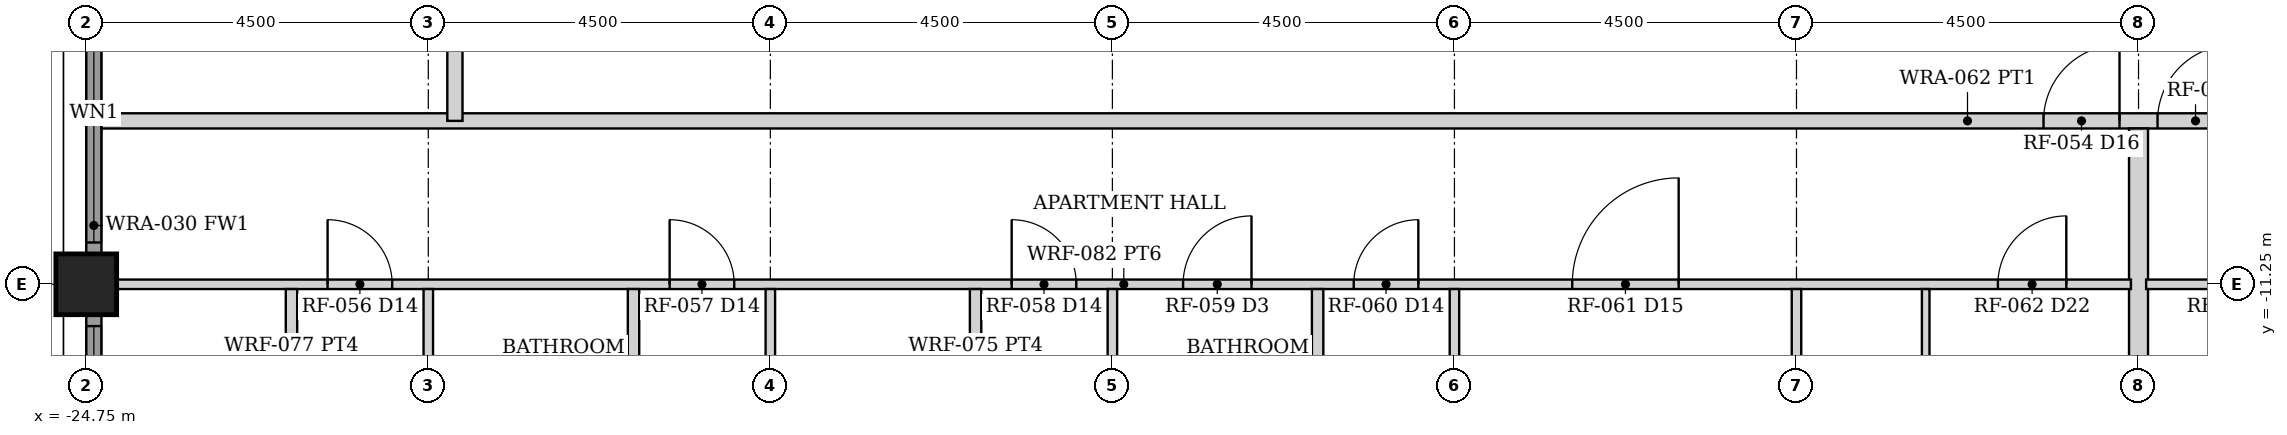
"""IFC4 building model, lengths in metres.
Left out: names, types, materials, properties, quantities, classifications, styles, units other than length and angle.
Written with IfcOpenShell. Run it as: python <this file> out.ifc"""

import sys

from ifc_helpers import new_model, si_unit, direction, frame, frame_2d, origin, origin_2d, place, context, subcontext, project, spatial, rectangle, hollow_rectangle, extrude, element, fill, save


model = new_model("IFC4")
c1 = context("Model", 3, precision=1e-05, world=origin(), true_north=direction((0.0, 1.0)))
c2 = subcontext(c1, "Body", "Model", "MODEL_VIEW")
j1 = project(units=[si_unit("LENGTHUNIT", "METRE"), si_unit("PLANEANGLEUNIT", "RADIAN")], contexts=[c1])
p1 = place(None, origin())
s1 = spatial("IfcSite", under=j1, at=p1, CompositionType="ELEMENT")
p2 = place(p1, origin())
s2 = spatial("IfcBuilding", under=s1, at=p2, CompositionType="ELEMENT")
p3 = place(p2, frame((0.0, 0.0, 79.0)))
s3 = spatial("IfcBuildingStorey", under=s2, at=p3, CompositionType="ELEMENT", Elevation=79.0)
p4 = place(p3, frame((-24.75, -11.25, 0.0), z_axis=(0.0, 0.0, 1.0), x_axis=(1.0, 0.0, 0.0)))
e1 = element("IfcColumn", 1, at=p4, inside=s3, PredefinedType="COLUMN", context=c2, shape_type="SweptSolid", body=[
    extrude(hollow_rectangle(XDim=0.8, YDim=0.8, WallThickness=0.06, at=origin_2d()), origin(), (0.0, 0.0, 1.0), 3.5),
])
p5 = place(p3, frame((-24.65, -15.345, 0.0), z_axis=(0.0, 0.0, 1.0), x_axis=(0.0, 1.0, 0.0)))
e2 = element("IfcWall", 2, at=p5, inside=s3, PredefinedType="SOLIDWALL", context=c2, shape_type="SweptSolid", body=[
    extrude(rectangle(XDim=3.69, YDim=0.2, at=frame_2d((1.845, 0.0))), origin(), (0.0, 0.0, 1.0), 2.379),
])
p6 = place(p5, frame((0.145, 0.0, 0.3)))
e3 = element("IfcOpeningElement", 3, at=p6, cuts=e2, PredefinedType="OPENING", context=c2, shape_type="SweptSolid", body=[
    extrude(rectangle(XDim=3.4, YDim=1.929, at=frame_2d((1.7, 0.964))), frame((0.0, 0.11, 0.0), z_axis=(0.0, -1.0, 0.0), x_axis=(1.0, 0.0, 0.0)), (0.0, 0.0, 1.0), 0.22),
])
p7 = place(p3, frame((-24.65, -10.845, 0.0), z_axis=(0.0, 0.0, 1.0), x_axis=(0.0, 1.0, 0.0)))
e4 = element("IfcWall", 4, at=p7, inside=s3, PredefinedType="SOLIDWALL", context=c2, shape_type="SweptSolid", body=[
    extrude(rectangle(XDim=3.69, YDim=0.2, at=frame_2d((1.845, 0.0))), origin(), (0.0, 0.0, 1.0), 2.379),
])
p8 = place(p7, frame((0.145, 0.0, 0.3)))
e5 = element("IfcOpeningElement", 5, at=p8, cuts=e4, PredefinedType="OPENING", context=c2, shape_type="SweptSolid", body=[
    extrude(rectangle(XDim=3.4, YDim=1.929, at=frame_2d((1.7, 0.964))), frame((0.0, 0.11, 0.0), z_axis=(0.0, -1.0, 0.0), x_axis=(1.0, 0.0, 0.0)), (0.0, 0.0, 1.0), 0.22),
])
p9 = place(p3, frame((-24.55, -9.1, 0.0), z_axis=(0.0, 0.0, 1.0), x_axis=(1.0, 0.0, 0.0)))
e6 = element("IfcWall", 6, at=p9, inside=s3, PredefinedType="PARTITIONING", context=c2, shape_type="SweptSolid", body=[
    extrude(rectangle(XDim=49.1, YDim=0.2, at=frame_2d((24.55, 0.0))), origin(), (0.0, 0.0, 1.0), 2.373),
])
p10 = place(p9, frame((25.55, 0.0, 0.0)))
e7 = element("IfcOpeningElement", 7, at=p10, cuts=e6, PredefinedType="OPENING", context=c2, shape_type="SweptSolid", body=[
    extrude(rectangle(XDim=1.0, YDim=2.3, at=frame_2d((0.5, 1.15))), frame((0.0, 0.11, 0.0), z_axis=(0.0, -1.0, 0.0), x_axis=(1.0, 0.0, 0.0)), (0.0, 0.0, 1.0), 0.22),
])
p11 = place(p9, frame((27.05, 0.0, 0.0)))
e8 = element("IfcOpeningElement", 8, at=p11, cuts=e6, PredefinedType="OPENING", context=c2, shape_type="SweptSolid", body=[
    extrude(rectangle(XDim=1.0, YDim=2.3, at=frame_2d((0.5, 1.15))), frame((0.0, 0.11, 0.0), z_axis=(0.0, -1.0, 0.0), x_axis=(1.0, 0.0, 0.0)), (0.0, 0.0, 1.0), 0.22),
])
p12 = place(p3, frame((-19.9, -9.1, 0.0), z_axis=(0.0, 0.0, 1.0), x_axis=(0.0, 1.0, 0.0)))
e9 = element("IfcWall", 9, at=p12, inside=s3, PredefinedType="PARTITIONING", context=c2, shape_type="SweptSolid", body=[
    extrude(rectangle(XDim=18.2, YDim=0.2, at=frame_2d((9.1, 0.0))), origin(), (0.0, 0.0, 1.0), 2.373),
])
p13 = place(p12, frame((6.35, 0.0, 0.0)))
e10 = element("IfcOpeningElement", 10, at=p13, cuts=e9, PredefinedType="OPENING", context=c2, shape_type="SweptSolid", body=[
    extrude(rectangle(XDim=1.0, YDim=2.3, at=frame_2d((0.5, 1.15))), frame((0.0, 0.11, 0.0), z_axis=(0.0, -1.0, 0.0), x_axis=(1.0, 0.0, 0.0)), (0.0, 0.0, 1.0), 0.22),
])
p14 = place(p3, frame((2.25, -24.35, 0.0), z_axis=(0.0, 0.0, 1.0), x_axis=(0.0, 1.0, 0.0)))
e11 = element("IfcWall", 11, at=p14, inside=s3, PredefinedType="PARTITIONING", context=c2, shape_type="SweptSolid", body=[
    extrude(rectangle(XDim=15.15, YDim=0.25, at=frame_2d((7.575, 0.0))), origin(), (0.0, 0.0, 1.0), 2.373),
])
p15 = place(p3, frame((-24.35, -11.25, 0.0), z_axis=(0.0, 0.0, 1.0), x_axis=(1.0, 0.0, 0.0)))
e12 = element("IfcWall", 12, at=p15, inside=s3, PredefinedType="PARTITIONING", context=c2, shape_type="SweptSolid", body=[
    extrude(rectangle(XDim=26.5, YDim=0.125, at=frame_2d((13.25, 0.0))), origin(), (0.0, 0.0, 1.0), 2.373),
])
p16 = place(p15, frame((24.75, 0.0, 0.0)))
e13 = element("IfcOpeningElement", 13, at=p16, cuts=e12, PredefinedType="OPENING", context=c2, shape_type="SweptSolid", body=[
    extrude(rectangle(XDim=0.9, YDim=2.1, at=frame_2d((0.45, 1.05))), frame((0.0, 0.073, 0.0), z_axis=(0.0, -1.0, 0.0), x_axis=(1.0, 0.0, 0.0)), (0.0, 0.0, 1.0), 0.145),
])
p17 = place(p15, frame((19.15, 0.0, 0.0)))
e14 = element("IfcOpeningElement", 14, at=p17, cuts=e12, PredefinedType="OPENING", context=c2, shape_type="SweptSolid", body=[
    extrude(rectangle(XDim=1.4, YDim=2.1, at=frame_2d((0.7, 1.05))), frame((0.0, 0.073, 0.0), z_axis=(0.0, -1.0, 0.0), x_axis=(1.0, 0.0, 0.0)), (0.0, 0.0, 1.0), 0.145),
])
p18 = place(p15, frame((16.275, 0.0, 0.0)))
e15 = element("IfcOpeningElement", 15, at=p18, cuts=e12, PredefinedType="OPENING", context=c2, shape_type="SweptSolid", body=[
    extrude(rectangle(XDim=0.85, YDim=2.1, at=frame_2d((0.425, 1.05))), frame((0.0, 0.073, 0.0), z_axis=(0.0, -1.0, 0.0), x_axis=(1.0, 0.0, 0.0)), (0.0, 0.0, 1.0), 0.145),
])
p19 = place(p15, frame((14.03, 0.0, 0.0)))
e16 = element("IfcOpeningElement", 16, at=p19, cuts=e12, PredefinedType="OPENING", context=c2, shape_type="SweptSolid", body=[
    extrude(rectangle(XDim=0.9, YDim=2.1, at=frame_2d((0.45, 1.05))), frame((0.0, 0.073, 0.0), z_axis=(0.0, -1.0, 0.0), x_axis=(1.0, 0.0, 0.0)), (0.0, 0.0, 1.0), 0.145),
])
p20 = place(p15, frame((11.775, 0.0, 0.0)))
e17 = element("IfcOpeningElement", 17, at=p20, cuts=e12, PredefinedType="OPENING", context=c2, shape_type="SweptSolid", body=[
    extrude(rectangle(XDim=0.85, YDim=2.1, at=frame_2d((0.425, 1.05))), frame((0.0, 0.073, 0.0), z_axis=(0.0, -1.0, 0.0), x_axis=(1.0, 0.0, 0.0)), (0.0, 0.0, 1.0), 0.145),
])
p21 = place(p15, frame((7.275, 0.0, 0.0)))
e18 = element("IfcOpeningElement", 18, at=p21, cuts=e12, PredefinedType="OPENING", context=c2, shape_type="SweptSolid", body=[
    extrude(rectangle(XDim=0.85, YDim=2.1, at=frame_2d((0.425, 1.05))), frame((0.0, 0.073, 0.0), z_axis=(0.0, -1.0, 0.0), x_axis=(1.0, 0.0, 0.0)), (0.0, 0.0, 1.0), 0.145),
])
p22 = place(p15, frame((2.775, 0.0, 0.0)))
e19 = element("IfcOpeningElement", 19, at=p22, cuts=e12, PredefinedType="OPENING", context=c2, shape_type="SweptSolid", body=[
    extrude(rectangle(XDim=0.85, YDim=2.1, at=frame_2d((0.425, 1.05))), frame((0.0, 0.073, 0.0), z_axis=(0.0, -1.0, 0.0), x_axis=(1.0, 0.0, 0.0)), (0.0, 0.0, 1.0), 0.145),
])
p23 = place(p3, frame((-0.55, -15.363, 0.0), z_axis=(0.0, 0.0, 1.0), x_axis=(0.0, 1.0, 0.0)))
e20 = element("IfcWall", 20, at=p23, inside=s3, PredefinedType="PARTITIONING", context=c2, shape_type="SweptSolid", body=[
    extrude(rectangle(XDim=4.05, YDim=0.1, at=frame_2d((2.025, 0.0))), origin(), (0.0, 0.0, 1.0), 2.373),
])
p24 = place(p3, frame((-2.25, -24.35, 0.0), z_axis=(0.0, 0.0, 1.0), x_axis=(0.0, 1.0, 0.0)))
e21 = element("IfcWall", 21, at=p24, inside=s3, PredefinedType="PARTITIONING", context=c2, shape_type="SweptSolid", body=[
    extrude(rectangle(XDim=13.038, YDim=0.125, at=frame_2d((6.519, 0.0))), origin(), (0.0, 0.0, 1.0), 2.373),
])
p25 = place(p24, frame((3.844, 0.0, 0.0)))
e22 = element("IfcOpeningElement", 22, at=p25, cuts=e21, PredefinedType="OPENING", context=c2, shape_type="SweptSolid", body=[
    extrude(rectangle(XDim=1.4, YDim=2.1, at=frame_2d((0.7, 1.05))), frame((0.0, 0.073, 0.0), z_axis=(0.0, -1.0, 0.0), x_axis=(1.0, 0.0, 0.0)), (0.0, 0.0, 1.0), 0.145),
])
p26 = place(p3, frame((-6.75, -24.35, 0.0), z_axis=(0.0, 0.0, 1.0), x_axis=(0.0, 1.0, 0.0)))
e23 = element("IfcWall", 23, at=p26, inside=s3, PredefinedType="PARTITIONING", context=c2, shape_type="SweptSolid", body=[
    extrude(rectangle(XDim=13.038, YDim=0.125, at=frame_2d((6.519, 0.0))), origin(), (0.0, 0.0, 1.0), 2.373),
])
p27 = place(p3, frame((-8.55, -14.4, 0.0), z_axis=(0.0, 0.0, 1.0), x_axis=(0.0, 1.0, 0.0)))
e24 = element("IfcWall", 24, at=p27, inside=s3, PredefinedType="PARTITIONING", context=c2, shape_type="SweptSolid", body=[
    extrude(rectangle(XDim=3.087, YDim=0.15, at=frame_2d((1.544, 0.0))), origin(), (0.0, 0.0, 1.0), 2.373),
])
p28 = place(p27, frame((1.2, 0.0, 0.0)))
e25 = element("IfcOpeningElement", 25, at=p28, cuts=e24, PredefinedType="OPENING", context=c2, shape_type="SweptSolid", body=[
    extrude(rectangle(XDim=0.8, YDim=2.1, at=frame_2d((0.4, 1.05))), frame((0.0, 0.085, 0.0), z_axis=(0.0, -1.0, 0.0), x_axis=(1.0, 0.0, 0.0)), (0.0, 0.0, 1.0), 0.17),
])
p29 = place(p3, frame((-11.25, -24.35, 0.0), z_axis=(0.0, 0.0, 1.0), x_axis=(0.0, 1.0, 0.0)))
e26 = element("IfcWall", 26, at=p29, inside=s3, PredefinedType="PARTITIONING", context=c2, shape_type="SweptSolid", body=[
    extrude(rectangle(XDim=13.038, YDim=0.125, at=frame_2d((6.519, 0.0))), origin(), (0.0, 0.0, 1.0), 2.373),
])
p30 = place(p3, frame((-13.05, -14.4, 0.0), z_axis=(0.0, 0.0, 1.0), x_axis=(0.0, 1.0, 0.0)))
e27 = element("IfcWall", 27, at=p30, inside=s3, PredefinedType="PARTITIONING", context=c2, shape_type="SweptSolid", body=[
    extrude(rectangle(XDim=3.087, YDim=0.15, at=frame_2d((1.544, 0.0))), origin(), (0.0, 0.0, 1.0), 2.373),
])
p31 = place(p30, frame((1.2, 0.0, 0.0)))
e28 = element("IfcOpeningElement", 28, at=p31, cuts=e27, PredefinedType="OPENING", context=c2, shape_type="SweptSolid", body=[
    extrude(rectangle(XDim=0.8, YDim=2.1, at=frame_2d((0.4, 1.05))), frame((0.0, 0.085, 0.0), z_axis=(0.0, -1.0, 0.0), x_axis=(1.0, 0.0, 0.0)), (0.0, 0.0, 1.0), 0.17),
])
p32 = place(p3, frame((-15.75, -24.35, 0.0), z_axis=(0.0, 0.0, 1.0), x_axis=(0.0, 1.0, 0.0)))
e29 = element("IfcWall", 29, at=p32, inside=s3, PredefinedType="PARTITIONING", context=c2, shape_type="SweptSolid", body=[
    extrude(rectangle(XDim=13.038, YDim=0.125, at=frame_2d((6.519, 0.0))), origin(), (0.0, 0.0, 1.0), 2.373),
])
p33 = place(p3, frame((-17.55, -14.4, 0.0), z_axis=(0.0, 0.0, 1.0), x_axis=(0.0, 1.0, 0.0)))
e30 = element("IfcWall", 30, at=p33, inside=s3, PredefinedType="PARTITIONING", context=c2, shape_type="SweptSolid", body=[
    extrude(rectangle(XDim=3.087, YDim=0.15, at=frame_2d((1.544, 0.0))), origin(), (0.0, 0.0, 1.0), 2.373),
])
p34 = place(p33, frame((1.2, 0.0, 0.0)))
e31 = element("IfcOpeningElement", 31, at=p34, cuts=e30, PredefinedType="OPENING", context=c2, shape_type="SweptSolid", body=[
    extrude(rectangle(XDim=0.8, YDim=2.1, at=frame_2d((0.4, 1.05))), frame((0.0, 0.085, 0.0), z_axis=(0.0, -1.0, 0.0), x_axis=(1.0, 0.0, 0.0)), (0.0, 0.0, 1.0), 0.17),
])
p35 = place(p3, frame((-20.25, -24.35, 0.0), z_axis=(0.0, 0.0, 1.0), x_axis=(0.0, 1.0, 0.0)))
e32 = element("IfcWall", 32, at=p35, inside=s3, PredefinedType="PARTITIONING", context=c2, shape_type="SweptSolid", body=[
    extrude(rectangle(XDim=13.038, YDim=0.125, at=frame_2d((6.519, 0.0))), origin(), (0.0, 0.0, 1.0), 2.373),
])
p36 = place(p3, frame((-22.05, -14.4, 0.0), z_axis=(0.0, 0.0, 1.0), x_axis=(0.0, 1.0, 0.0)))
e33 = element("IfcWall", 33, at=p36, inside=s3, PredefinedType="PARTITIONING", context=c2, shape_type="SweptSolid", body=[
    extrude(rectangle(XDim=3.087, YDim=0.15, at=frame_2d((1.544, 0.0))), origin(), (0.0, 0.0, 1.0), 2.373),
])
p37 = place(p36, frame((1.2, 0.0, 0.0)))
e34 = element("IfcOpeningElement", 34, at=p37, cuts=e33, PredefinedType="OPENING", context=c2, shape_type="SweptSolid", body=[
    extrude(rectangle(XDim=0.8, YDim=2.1, at=frame_2d((0.4, 1.05))), frame((0.0, 0.085, 0.0), z_axis=(0.0, -1.0, 0.0), x_axis=(1.0, 0.0, 0.0)), (0.0, 0.0, 1.0), 0.17),
])
p38 = place(p3, frame((2.35, -11.25, 0.0), z_axis=(0.0, 0.0, 1.0), x_axis=(1.0, 0.0, 0.0)))
e35 = element("IfcWall", 35, at=p38, inside=s3, PredefinedType="PARTITIONING", context=c2, shape_type="SweptSolid", body=[
    extrude(rectangle(XDim=22.0, YDim=0.125, at=frame_2d((11.0, 0.0))), origin(), (0.0, 0.0, 1.0), 2.373),
])
p39 = place(p38, frame((0.85, 0.0, 0.0)))
e36 = element("IfcOpeningElement", 36, at=p39, cuts=e35, PredefinedType="OPENING", context=c2, shape_type="SweptSolid", body=[
    extrude(rectangle(XDim=0.9, YDim=2.1, at=frame_2d((0.45, 1.05))), frame((0.0, 0.073, 0.0), z_axis=(0.0, -1.0, 0.0), x_axis=(1.0, 0.0, 0.0)), (0.0, 0.0, 1.0), 0.145),
])
p40 = place(p38, frame((5.95, 0.0, 0.0)))
e37 = element("IfcOpeningElement", 37, at=p40, cuts=e35, PredefinedType="OPENING", context=c2, shape_type="SweptSolid", body=[
    extrude(rectangle(XDim=1.4, YDim=2.1, at=frame_2d((0.7, 1.05))), frame((0.0, 0.073, 0.0), z_axis=(0.0, -1.0, 0.0), x_axis=(1.0, 0.0, 0.0)), (0.0, 0.0, 1.0), 0.145),
])
p41 = place(p38, frame((9.375, 0.0, 0.0)))
e38 = element("IfcOpeningElement", 38, at=p41, cuts=e35, PredefinedType="OPENING", context=c2, shape_type="SweptSolid", body=[
    extrude(rectangle(XDim=0.85, YDim=2.1, at=frame_2d((0.425, 1.05))), frame((0.0, 0.073, 0.0), z_axis=(0.0, -1.0, 0.0), x_axis=(1.0, 0.0, 0.0)), (0.0, 0.0, 1.0), 0.145),
])
p42 = place(p38, frame((11.57, 0.0, 0.0)))
e39 = element("IfcOpeningElement", 39, at=p42, cuts=e35, PredefinedType="OPENING", context=c2, shape_type="SweptSolid", body=[
    extrude(rectangle(XDim=0.9, YDim=2.1, at=frame_2d((0.45, 1.05))), frame((0.0, 0.073, 0.0), z_axis=(0.0, -1.0, 0.0), x_axis=(1.0, 0.0, 0.0)), (0.0, 0.0, 1.0), 0.145),
])
p43 = place(p38, frame((13.875, 0.0, 0.0)))
e40 = element("IfcOpeningElement", 40, at=p43, cuts=e35, PredefinedType="OPENING", context=c2, shape_type="SweptSolid", body=[
    extrude(rectangle(XDim=0.85, YDim=2.1, at=frame_2d((0.425, 1.05))), frame((0.0, 0.073, 0.0), z_axis=(0.0, -1.0, 0.0), x_axis=(1.0, 0.0, 0.0)), (0.0, 0.0, 1.0), 0.145),
])
p44 = place(p38, frame((18.375, 0.0, 0.0)))
e41 = element("IfcOpeningElement", 41, at=p44, cuts=e35, PredefinedType="OPENING", context=c2, shape_type="SweptSolid", body=[
    extrude(rectangle(XDim=0.85, YDim=2.1, at=frame_2d((0.425, 1.05))), frame((0.0, 0.073, 0.0), z_axis=(0.0, -1.0, 0.0), x_axis=(1.0, 0.0, 0.0)), (0.0, 0.0, 1.0), 0.145),
])
p45 = place(p6, origin())
e42 = element("IfcWindow", 42, at=p45, inside=s3, PartitioningType="SINGLE_PANEL", PredefinedType="WINDOW", context=c2, shape_type="SweptSolid", body=[
    extrude(rectangle(XDim=3.4, YDim=1.929, at=frame_2d((1.7, 0.964))), frame((0.0, 0.03, 0.0), z_axis=(0.0, -1.0, 0.0), x_axis=(1.0, 0.0, 0.0)), (0.0, 0.0, 1.0), 0.06),
])
fill(e3, e42)
p46 = place(p8, origin())
e43 = element("IfcWindow", 43, at=p46, inside=s3, PartitioningType="SINGLE_PANEL", PredefinedType="WINDOW", context=c2, shape_type="SweptSolid", body=[
    extrude(rectangle(XDim=3.4, YDim=1.929, at=frame_2d((1.7, 0.964))), frame((0.0, 0.03, 0.0), z_axis=(0.0, -1.0, 0.0), x_axis=(1.0, 0.0, 0.0)), (0.0, 0.0, 1.0), 0.06),
])
fill(e5, e43)
p47 = place(p10, origin())
e44 = element("IfcDoor", 44, at=p47, inside=s3, OperationType="SINGLE_SWING_RIGHT", PredefinedType="DOOR", context=c2, shape_type="SweptSolid", body=[
    extrude(rectangle(XDim=1.0, YDim=2.3, at=frame_2d((0.5, 1.15))), frame((0.0, 0.025, 0.0), z_axis=(0.0, -1.0, 0.0), x_axis=(1.0, 0.0, 0.0)), (0.0, 0.0, 1.0), 0.05),
])
fill(e7, e44)
p48 = place(p16, origin())
e45 = element("IfcDoor", 45, at=p48, inside=s3, OperationType="SINGLE_SWING_RIGHT", PredefinedType="DOOR", context=c2, shape_type="SweptSolid", body=[
    extrude(rectangle(XDim=0.9, YDim=2.1, at=frame_2d((0.45, 1.05))), frame((0.0, 0.025, 0.0), z_axis=(0.0, -1.0, 0.0), x_axis=(1.0, 0.0, 0.0)), (0.0, 0.0, 1.0), 0.05),
])
fill(e13, e45)
p49 = place(p17, origin())
e46 = element("IfcDoor", 46, at=p49, inside=s3, OperationType="SINGLE_SWING_RIGHT", PredefinedType="DOOR", context=c2, shape_type="SweptSolid", body=[
    extrude(rectangle(XDim=1.4, YDim=2.1, at=frame_2d((0.7, 1.05))), frame((0.0, 0.025, 0.0), z_axis=(0.0, -1.0, 0.0), x_axis=(1.0, 0.0, 0.0)), (0.0, 0.0, 1.0), 0.05),
])
fill(e14, e46)
p50 = place(p18, origin())
e47 = element("IfcDoor", 47, at=p50, inside=s3, OperationType="SINGLE_SWING_RIGHT", PredefinedType="DOOR", context=c2, shape_type="SweptSolid", body=[
    extrude(rectangle(XDim=0.85, YDim=2.1, at=frame_2d((0.425, 1.05))), frame((0.0, 0.025, 0.0), z_axis=(0.0, -1.0, 0.0), x_axis=(1.0, 0.0, 0.0)), (0.0, 0.0, 1.0), 0.05),
])
fill(e15, e47)
p51 = place(p19, origin())
e48 = element("IfcDoor", 48, at=p51, inside=s3, OperationType="SINGLE_SWING_RIGHT", PredefinedType="DOOR", context=c2, shape_type="SweptSolid", body=[
    extrude(rectangle(XDim=0.9, YDim=2.1, at=frame_2d((0.45, 1.05))), frame((0.0, 0.025, 0.0), z_axis=(0.0, -1.0, 0.0), x_axis=(1.0, 0.0, 0.0)), (0.0, 0.0, 1.0), 0.05),
])
fill(e16, e48)
p52 = place(p20, origin())
e49 = element("IfcDoor", 49, at=p52, inside=s3, OperationType="SINGLE_SWING_LEFT", PredefinedType="DOOR", context=c2, shape_type="SweptSolid", body=[
    extrude(rectangle(XDim=0.85, YDim=2.1, at=frame_2d((0.425, 1.05))), frame((0.0, 0.025, 0.0), z_axis=(0.0, -1.0, 0.0), x_axis=(1.0, 0.0, 0.0)), (0.0, 0.0, 1.0), 0.05),
])
fill(e17, e49)
p53 = place(p21, origin())
e50 = element("IfcDoor", 50, at=p53, inside=s3, OperationType="SINGLE_SWING_LEFT", PredefinedType="DOOR", context=c2, shape_type="SweptSolid", body=[
    extrude(rectangle(XDim=0.85, YDim=2.1, at=frame_2d((0.425, 1.05))), frame((0.0, 0.025, 0.0), z_axis=(0.0, -1.0, 0.0), x_axis=(1.0, 0.0, 0.0)), (0.0, 0.0, 1.0), 0.05),
])
fill(e18, e50)
p54 = place(p22, origin())
e51 = element("IfcDoor", 51, at=p54, inside=s3, OperationType="SINGLE_SWING_LEFT", PredefinedType="DOOR", context=c2, shape_type="SweptSolid", body=[
    extrude(rectangle(XDim=0.85, YDim=2.1, at=frame_2d((0.425, 1.05))), frame((0.0, 0.025, 0.0), z_axis=(0.0, -1.0, 0.0), x_axis=(1.0, 0.0, 0.0)), (0.0, 0.0, 1.0), 0.05),
])
fill(e19, e51)
p55 = place(p11, origin())
e52 = element("IfcDoor", 52, at=p55, inside=s3, OperationType="SINGLE_SWING_RIGHT", PredefinedType="DOOR", context=c2, shape_type="SweptSolid", body=[
    extrude(rectangle(XDim=1.0, YDim=2.3, at=frame_2d((0.5, 1.15))), frame((0.0, 0.025, 0.0), z_axis=(0.0, -1.0, 0.0), x_axis=(1.0, 0.0, 0.0)), (0.0, 0.0, 1.0), 0.05),
])
fill(e8, e52)
save(model, sys.argv[1])
